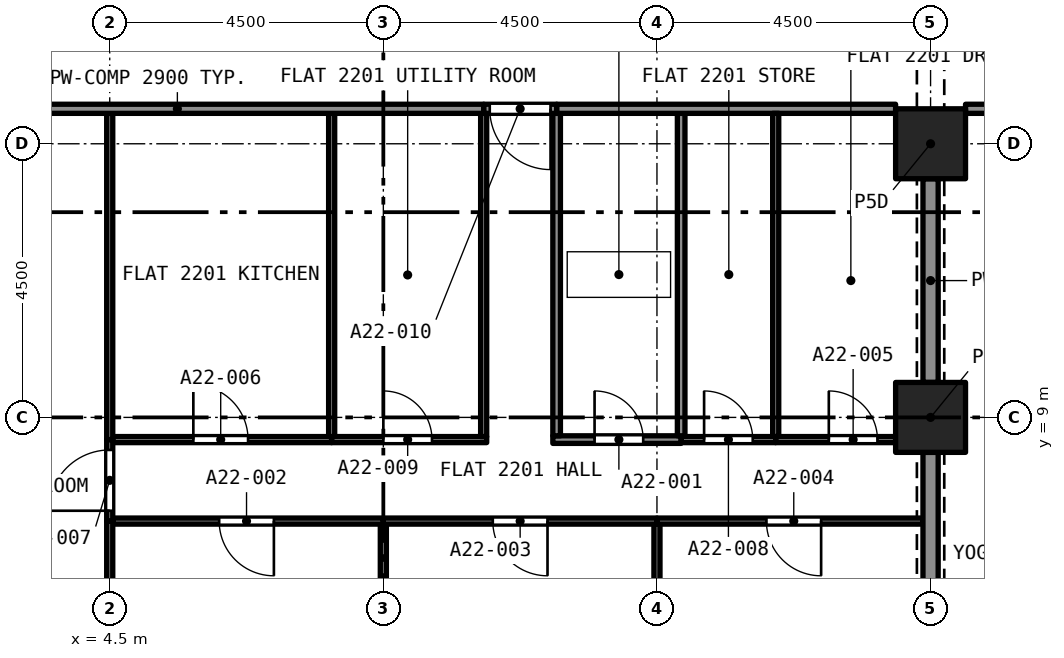
"""IFC4 building model, lengths in metres.
Left out: names, types, materials, properties, quantities, classifications, styles, units other than length and angle.
Written with IfcOpenShell. Run it as: python <this file> out.ifc"""

import sys

from ifc_helpers import new_model, si_unit, direction, frame, frame_2d, origin, origin_2d, place, context, subcontext, project, spatial, rectangle, extrude, element, fill, save


model = new_model("IFC4")
c1 = context("Model", 3, precision=1e-05, world=origin(), true_north=direction((0.0, 1.0)))
c2 = subcontext(c1, "Body", "Model", "MODEL_VIEW")
j1 = project(units=[si_unit("LENGTHUNIT", "METRE"), si_unit("PLANEANGLEUNIT", "RADIAN")], contexts=[c1])
p1 = place(None, origin())
s1 = spatial("IfcSite", under=j1, at=p1, CompositionType="ELEMENT")
p2 = place(p1, origin())
s2 = spatial("IfcBuilding", under=s1, at=p2, CompositionType="ELEMENT")
p3 = place(p2, frame((0.0, 0.0, 83.2)))
s3 = spatial("IfcBuildingStorey", under=s2, at=p3, CompositionType="ELEMENT", Elevation=83.2)
for number, where, z_axis, x_axis in (
    (1, (18.0, 9.0, 0.0), (0.0, 0.0, 1.0), (1.0, 0.0, 0.0)),
    (2, (18.0, 13.5, 0.0), (0.0, 0.0, 1.0), (1.0, 0.0, 0.0)),
):
    element("IfcColumn", number, at=place(p3, frame(where, z_axis=z_axis, x_axis=x_axis)), inside=s3, PredefinedType="COLUMN", context=c2, shape_type="SweptSolid", body=[
        extrude(rectangle(XDim=1.15, YDim=1.15, at=origin_2d()), origin(), (0.0, 0.0, 1.0), 3.2),
    ])
p4 = place(p3, frame((11.788, 8.635, 0.0), z_axis=(0.0, 0.0, 1.0), x_axis=(1.0, 0.0, 0.0)))
e3 = element("IfcWall", 3, at=p4, inside=s3, PredefinedType="PARTITIONING", context=c2, shape_type="SweptSolid", body=[
    extrude(rectangle(XDim=2.11, YDim=0.125, at=frame_2d((1.055, 0.0))), origin(), (0.0, 0.0, 1.0), 2.9),
])
p5 = place(p4, frame((0.686, 0.0, 0.0)))
e4 = element("IfcOpeningElement", 4, at=p5, cuts=e3, PredefinedType="OPENING", context=c2, shape_type="SweptSolid", body=[
    extrude(rectangle(XDim=0.8, YDim=2.1, at=frame_2d((0.4, 1.05))), frame((0.0, 0.073, 0.0), z_axis=(0.0, -1.0, 0.0), x_axis=(1.0, 0.0, 0.0)), (0.0, 0.0, 1.0), 0.145),
])
for number, where, z_axis, x_axis in (
    (5, (11.85, 8.698, 0.0), (0.0, 0.0, 1.0), (0.0, 1.0, 0.0)),
    (6, (13.898, 8.698, 0.0), (0.0, 0.0, 1.0), (0.0, 1.0, 0.0)),
):
    element("IfcWall", number, at=place(p3, frame(where, z_axis=z_axis, x_axis=x_axis)), inside=s3, PredefinedType="PARTITIONING", context=c2, shape_type="SweptSolid", body=[
        extrude(rectangle(XDim=5.302, YDim=0.125, at=frame_2d((2.651, 0.0))), origin(), (0.0, 0.0, 1.0), 2.9),
    ])
p6 = place(p3, frame((11.85, 14.075, 0.0), z_axis=(0.0, 0.0, 1.0), x_axis=(1.0, 0.0, 0.0)))
e7 = element("IfcWall", 7, at=p6, inside=s3, PredefinedType="PARTITIONING", context=c2, shape_type="SweptSolid", body=[
    extrude(rectangle(XDim=5.575, YDim=0.15, at=frame_2d((2.788, 0.0))), origin(), (0.0, 0.0, 1.0), 2.9),
])
p7 = place(p3, frame((9.0, 0.575, 0.0), z_axis=(0.0, 0.0, 1.0), x_axis=(0.0, 1.0, 0.0)))
e8 = element("IfcWall", 8, at=p7, inside=s3, PredefinedType="PARTITIONING", context=c2, shape_type="SweptSolid", body=[
    extrude(rectangle(XDim=6.67, YDim=0.1, at=frame_2d((3.335, 0.0))), origin(), (0.0, 0.0, 1.0), 2.9),
])
p8 = place(p3, frame((9.0, 7.295, 0.0), z_axis=(0.0, 0.0, 1.0), x_axis=(-1.0, 0.0, 0.0)))
e9 = element("IfcWall", 9, at=p8, inside=s3, PredefinedType="PARTITIONING", context=c2, shape_type="SweptSolid", body=[
    extrude(rectangle(XDim=4.45, YDim=0.1, at=frame_2d((2.225, 0.0))), origin(), (0.0, 0.0, 1.0), 2.9),
])
p9 = place(p8, frame((1.8, 0.0, 0.0)))
e10 = element("IfcOpeningElement", 10, at=p9, cuts=e9, PredefinedType="OPENING", context=c2, shape_type="SweptSolid", body=[
    extrude(rectangle(XDim=0.9, YDim=2.1, at=frame_2d((0.45, 1.05))), frame((0.0, 0.06, 0.0), z_axis=(0.0, -1.0, 0.0), x_axis=(1.0, 0.0, 0.0)), (0.0, 0.0, 1.0), 0.12),
])
p10 = place(p3, frame((4.5, 0.622, 0.0), z_axis=(0.0, 0.0, 1.0), x_axis=(0.0, 1.0, 0.0)))
e11 = element("IfcWall", 11, at=p10, inside=s3, PredefinedType="PARTITIONING", context=c2, shape_type="SweptSolid", body=[
    extrude(rectangle(XDim=6.673, YDim=0.1, at=frame_2d((3.336, 0.0))), origin(), (0.0, 0.0, 1.0), 2.9),
])
p11 = place(p3, frame((13.5, 0.575, 0.0), z_axis=(0.0, 0.0, 1.0), x_axis=(0.0, 1.0, 0.0)))
e12 = element("IfcWall", 12, at=p11, inside=s3, PredefinedType="PARTITIONING", context=c2, shape_type="SweptSolid", body=[
    extrude(rectangle(XDim=6.67, YDim=0.1, at=frame_2d((3.335, 0.0))), origin(), (0.0, 0.0, 1.0), 2.9),
])
p12 = place(p3, frame((13.5, 7.295, 0.0), z_axis=(0.0, 0.0, 1.0), x_axis=(-1.0, 0.0, 0.0)))
e13 = element("IfcWall", 13, at=p12, inside=s3, PredefinedType="PARTITIONING", context=c2, shape_type="SweptSolid", body=[
    extrude(rectangle(XDim=4.5, YDim=0.1, at=frame_2d((2.25, 0.0))), origin(), (0.0, 0.0, 1.0), 2.9),
])
p13 = place(p12, frame((1.8, 0.0, 0.0)))
e14 = element("IfcOpeningElement", 14, at=p13, cuts=e13, PredefinedType="OPENING", context=c2, shape_type="SweptSolid", body=[
    extrude(rectangle(XDim=0.9, YDim=2.1, at=frame_2d((0.45, 1.05))), frame((0.0, 0.06, 0.0), z_axis=(0.0, -1.0, 0.0), x_axis=(1.0, 0.0, 0.0)), (0.0, 0.0, 1.0), 0.12),
])
p14 = place(p3, frame((17.875, 7.295, 0.0), z_axis=(0.0, 0.0, 1.0), x_axis=(-1.0, 0.0, 0.0)))
e15 = element("IfcWall", 15, at=p14, inside=s3, PredefinedType="PARTITIONING", context=c2, shape_type="SweptSolid", body=[
    extrude(rectangle(XDim=4.375, YDim=0.1, at=frame_2d((2.188, 0.0))), origin(), (0.0, 0.0, 1.0), 2.9),
])
p15 = place(p14, frame((1.675, 0.0, 0.0)))
e16 = element("IfcOpeningElement", 16, at=p15, cuts=e15, PredefinedType="OPENING", context=c2, shape_type="SweptSolid", body=[
    extrude(rectangle(XDim=0.9, YDim=2.1, at=frame_2d((0.45, 1.05))), frame((0.0, 0.06, 0.0), z_axis=(0.0, -1.0, 0.0), x_axis=(1.0, 0.0, 0.0)), (0.0, 0.0, 1.0), 0.12),
])
p16 = place(p3, frame((18.0, 5.075, 0.0), z_axis=(0.0, 0.0, 1.0), x_axis=(0.0, 1.0, 0.0)))
e17 = element("IfcWall", 17, at=p16, inside=s3, PredefinedType="PARTITIONING", context=c2, shape_type="SweptSolid", body=[
    extrude(rectangle(XDim=3.35, YDim=0.25, at=frame_2d((1.675, 0.0))), origin(), (0.0, 0.0, 1.0), 2.38),
])
p17 = place(p3, frame((15.453, 8.635, 0.0), z_axis=(0.0, 0.0, 1.0), x_axis=(1.0, 0.0, 0.0)))
e18 = element("IfcWall", 18, at=p17, inside=s3, PredefinedType="PARTITIONING", context=c2, shape_type="SweptSolid", body=[
    extrude(rectangle(XDim=1.972, YDim=0.1, at=frame_2d((0.986, 0.0))), origin(), (0.0, 0.0, 1.0), 2.9),
])
p18 = place(p17, frame((0.874, 0.0, 0.0)))
e19 = element("IfcOpeningElement", 19, at=p18, cuts=e18, PredefinedType="OPENING", context=c2, shape_type="SweptSolid", body=[
    extrude(rectangle(XDim=0.8, YDim=2.1, at=frame_2d((0.4, 1.05))), frame((0.0, 0.06, 0.0), z_axis=(0.0, -1.0, 0.0), x_axis=(1.0, 0.0, 0.0)), (0.0, 0.0, 1.0), 0.12),
])
p19 = place(p3, frame((15.453, 8.685, 0.0), z_axis=(0.0, 0.0, 1.0), x_axis=(0.0, 1.0, 0.0)))
e20 = element("IfcWall", 20, at=p19, inside=s3, PredefinedType="PARTITIONING", context=c2, shape_type="SweptSolid", body=[
    extrude(rectangle(XDim=5.315, YDim=0.1, at=frame_2d((2.657, 0.0))), origin(), (0.0, 0.0, 1.0), 2.9),
])
p20 = place(p3, frame((18.0, 9.575, 0.0), z_axis=(0.0, 0.0, 1.0), x_axis=(0.0, 1.0, 0.0)))
e21 = element("IfcWall", 21, at=p20, inside=s3, PredefinedType="PARTITIONING", context=c2, shape_type="SweptSolid", body=[
    extrude(rectangle(XDim=3.35, YDim=0.25, at=frame_2d((1.675, 0.0))), origin(), (0.0, 0.0, 1.0), 2.38),
])
p21 = place(p3, frame((4.55, 8.635, 0.0), z_axis=(0.0, 0.0, 1.0), x_axis=(1.0, 0.0, 0.0)))
e22 = element("IfcWall", 22, at=p21, inside=s3, PredefinedType="PARTITIONING", context=c2, shape_type="SweptSolid", body=[
    extrude(rectangle(XDim=3.6, YDim=0.1, at=frame_2d((1.8, 0.0))), origin(), (0.0, 0.0, 1.0), 2.9),
])
p22 = place(p21, frame((1.325, 0.0, 0.0)))
e23 = element("IfcOpeningElement", 23, at=p22, cuts=e22, PredefinedType="OPENING", context=c2, shape_type="SweptSolid", body=[
    extrude(rectangle(XDim=0.9, YDim=2.1, at=frame_2d((0.45, 1.05))), frame((0.0, 0.06, 0.0), z_axis=(0.0, -1.0, 0.0), x_axis=(1.0, 0.0, 0.0)), (0.0, 0.0, 1.0), 0.12),
])
p23 = place(p3, frame((4.5, 7.295, 0.0), z_axis=(0.0, 0.0, 1.0), x_axis=(0.0, 1.0, 0.0)))
e24 = element("IfcWall", 24, at=p23, inside=s3, PredefinedType="PARTITIONING", context=c2, shape_type="SweptSolid", body=[
    extrude(rectangle(XDim=1.34, YDim=0.1, at=frame_2d((0.67, 0.0))), origin(), (0.0, 0.0, 1.0), 2.9),
])
p24 = place(p23, frame((0.17, 0.0, 0.0)))
e25 = element("IfcOpeningElement", 25, at=p24, cuts=e24, PredefinedType="OPENING", context=c2, shape_type="SweptSolid", body=[
    extrude(rectangle(XDim=1.0, YDim=2.1, at=frame_2d((0.5, 1.05))), frame((0.0, 0.06, 0.0), z_axis=(0.0, -1.0, 0.0), x_axis=(1.0, 0.0, 0.0)), (0.0, 0.0, 1.0), 0.12),
])
p25 = place(p3, frame((13.898, 8.635, 0.0), z_axis=(0.0, 0.0, 1.0), x_axis=(1.0, 0.0, 0.0)))
e26 = element("IfcWall", 26, at=p25, inside=s3, PredefinedType="PARTITIONING", context=c2, shape_type="SweptSolid", body=[
    extrude(rectangle(XDim=1.555, YDim=0.1, at=frame_2d((0.778, 0.0))), origin(), (0.0, 0.0, 1.0), 2.9),
])
p26 = place(p25, frame((0.378, 0.0, 0.0)))
e27 = element("IfcOpeningElement", 27, at=p26, cuts=e26, PredefinedType="OPENING", context=c2, shape_type="SweptSolid", body=[
    extrude(rectangle(XDim=0.8, YDim=2.1, at=frame_2d((0.4, 1.05))), frame((0.0, 0.06, 0.0), z_axis=(0.0, -1.0, 0.0), x_axis=(1.0, 0.0, 0.0)), (0.0, 0.0, 1.0), 0.12),
])
p27 = place(p3, frame((8.15, 8.635, 0.0), z_axis=(0.0, 0.0, 1.0), x_axis=(1.0, 0.0, 0.0)))
e28 = element("IfcWall", 28, at=p27, inside=s3, PredefinedType="PARTITIONING", context=c2, shape_type="SweptSolid", body=[
    extrude(rectangle(XDim=2.55, YDim=0.1, at=frame_2d((1.275, 0.0))), origin(), (0.0, 0.0, 1.0), 2.9),
])
p28 = place(p27, frame((0.85, 0.0, 0.0)))
e29 = element("IfcOpeningElement", 29, at=p28, cuts=e28, PredefinedType="OPENING", context=c2, shape_type="SweptSolid", body=[
    extrude(rectangle(XDim=0.8, YDim=2.1, at=frame_2d((0.4, 1.05))), frame((0.0, 0.06, 0.0), z_axis=(0.0, -1.0, 0.0), x_axis=(1.0, 0.0, 0.0)), (0.0, 0.0, 1.0), 0.12),
])
p29 = place(p3, frame((10.65, 8.685, 0.0), z_axis=(0.0, 0.0, 1.0), x_axis=(0.0, 1.0, 0.0)))
e30 = element("IfcWall", 30, at=p29, inside=s3, PredefinedType="PARTITIONING", context=c2, shape_type="SweptSolid", body=[
    extrude(rectangle(XDim=5.315, YDim=0.1, at=frame_2d((2.657, 0.0))), origin(), (0.0, 0.0, 1.0), 2.9),
])
p30 = place(p3, frame((11.85, 14.075, 0.0), z_axis=(0.0, 0.0, 1.0), x_axis=(-1.0, 0.0, 0.0)))
e31 = element("IfcWall", 31, at=p30, inside=s3, PredefinedType="PARTITIONING", context=c2, shape_type="SweptSolid", body=[
    extrude(rectangle(XDim=1.2, YDim=0.15, at=frame_2d((0.6, 0.0))), origin(), (0.0, 0.0, 1.0), 2.9),
])
p31 = place(p30, frame((0.1, 0.0, 0.0)))
e32 = element("IfcOpeningElement", 32, at=p31, cuts=e31, PredefinedType="OPENING", context=c2, shape_type="SweptSolid", body=[
    extrude(rectangle(XDim=1.0, YDim=2.1, at=frame_2d((0.5, 1.05))), frame((0.0, 0.085, 0.0), z_axis=(0.0, -1.0, 0.0), x_axis=(1.0, 0.0, 0.0)), (0.0, 0.0, 1.0), 0.17),
])
p32 = place(p3, frame((4.5, 8.635, 0.0), z_axis=(0.0, 0.0, 1.0), x_axis=(0.0, 1.0, 0.0)))
e33 = element("IfcWall", 33, at=p32, inside=s3, PredefinedType="PARTITIONING", context=c2, shape_type="SweptSolid", body=[
    extrude(rectangle(XDim=5.365, YDim=0.1, at=frame_2d((2.683, 0.0))), origin(), (0.0, 0.0, 1.0), 2.9),
])
p33 = place(p3, frame((8.15, 8.685, 0.0), z_axis=(0.0, 0.0, 1.0), x_axis=(0.0, 1.0, 0.0)))
e34 = element("IfcWall", 34, at=p33, inside=s3, PredefinedType="PARTITIONING", context=c2, shape_type="SweptSolid", body=[
    extrude(rectangle(XDim=5.315, YDim=0.1, at=frame_2d((2.657, 0.0))), origin(), (0.0, 0.0, 1.0), 2.9),
])
p34 = place(p3, frame((0.575, 14.075, 0.0), z_axis=(0.0, 0.0, 1.0), x_axis=(1.0, 0.0, 0.0)))
e35 = element("IfcWall", 35, at=p34, inside=s3, PredefinedType="PARTITIONING", context=c2, shape_type="SweptSolid", body=[
    extrude(rectangle(XDim=10.075, YDim=0.15, at=frame_2d((5.038, 0.0))), origin(), (0.0, 0.0, 1.0), 2.9),
])
p35 = place(p3, frame((22.5, 14.075, 0.0), z_axis=(0.0, 0.0, 1.0), x_axis=(-1.0, 0.0, 0.0)))
e36 = element("IfcWall", 36, at=p35, inside=s3, PredefinedType="PARTITIONING", context=c2, shape_type="SweptSolid", body=[
    extrude(rectangle(XDim=3.925, YDim=0.15, at=frame_2d((1.962, 0.0))), origin(), (0.0, 0.0, 1.0), 2.75),
])
p36 = place(p35, frame((1.75, 0.0, 0.0)))
e37 = element("IfcOpeningElement", 37, at=p36, cuts=e36, PredefinedType="OPENING", context=c2, shape_type="SweptSolid", body=[
    extrude(rectangle(XDim=1.0, YDim=2.1, at=frame_2d((0.5, 1.05))), frame((0.0, 0.085, 0.0), z_axis=(0.0, -1.0, 0.0), x_axis=(1.0, 0.0, 0.0)), (0.0, 0.0, 1.0), 0.17),
])
p37 = place(p5, origin())
e38 = element("IfcDoor", 38, at=p37, inside=s3, OperationType="SINGLE_SWING_RIGHT", PredefinedType="DOOR", context=c2, shape_type="SweptSolid", body=[
    extrude(rectangle(XDim=0.8, YDim=2.1, at=frame_2d((0.4, 1.05))), frame((0.0, 0.025, 0.0), z_axis=(0.0, -1.0, 0.0), x_axis=(1.0, 0.0, 0.0)), (0.0, 0.0, 1.0), 0.05),
])
fill(e4, e38)
p38 = place(p9, origin())
e39 = element("IfcDoor", 39, at=p38, inside=s3, OperationType="SINGLE_SWING_RIGHT", PredefinedType="DOOR", context=c2, shape_type="SweptSolid", body=[
    extrude(rectangle(XDim=0.9, YDim=2.1, at=frame_2d((0.45, 1.05))), frame((0.0, 0.025, 0.0), z_axis=(0.0, -1.0, 0.0), x_axis=(1.0, 0.0, 0.0)), (0.0, 0.0, 1.0), 0.05),
])
fill(e10, e39)
p39 = place(p13, origin())
e40 = element("IfcDoor", 40, at=p39, inside=s3, OperationType="SINGLE_SWING_LEFT", PredefinedType="DOOR", context=c2, shape_type="SweptSolid", body=[
    extrude(rectangle(XDim=0.9, YDim=2.1, at=frame_2d((0.45, 1.05))), frame((0.0, 0.025, 0.0), z_axis=(0.0, -1.0, 0.0), x_axis=(1.0, 0.0, 0.0)), (0.0, 0.0, 1.0), 0.05),
])
fill(e14, e40)
p40 = place(p15, origin())
e41 = element("IfcDoor", 41, at=p40, inside=s3, OperationType="SINGLE_SWING_LEFT", PredefinedType="DOOR", context=c2, shape_type="SweptSolid", body=[
    extrude(rectangle(XDim=0.9, YDim=2.1, at=frame_2d((0.45, 1.05))), frame((0.0, 0.025, 0.0), z_axis=(0.0, -1.0, 0.0), x_axis=(1.0, 0.0, 0.0)), (0.0, 0.0, 1.0), 0.05),
])
fill(e16, e41)
p41 = place(p18, origin())
e42 = element("IfcDoor", 42, at=p41, inside=s3, OperationType="SINGLE_SWING_RIGHT", PredefinedType="DOOR", context=c2, shape_type="SweptSolid", body=[
    extrude(rectangle(XDim=0.8, YDim=2.1, at=frame_2d((0.4, 1.05))), frame((0.0, 0.025, 0.0), z_axis=(0.0, -1.0, 0.0), x_axis=(1.0, 0.0, 0.0)), (0.0, 0.0, 1.0), 0.05),
])
fill(e19, e42)
p42 = place(p22, origin())
e43 = element("IfcDoor", 43, at=p42, inside=s3, OperationType="SINGLE_SWING_LEFT", PredefinedType="DOOR", context=c2, shape_type="SweptSolid", body=[
    extrude(rectangle(XDim=0.9, YDim=2.1, at=frame_2d((0.45, 1.05))), frame((0.0, 0.025, 0.0), z_axis=(0.0, -1.0, 0.0), x_axis=(1.0, 0.0, 0.0)), (0.0, 0.0, 1.0), 0.05),
])
fill(e23, e43)
p43 = place(p24, origin())
e44 = element("IfcDoor", 44, at=p43, inside=s3, OperationType="SINGLE_SWING_RIGHT", PredefinedType="DOOR", context=c2, shape_type="SweptSolid", body=[
    extrude(rectangle(XDim=1.0, YDim=2.1, at=frame_2d((0.5, 1.05))), frame((0.0, 0.025, 0.0), z_axis=(0.0, -1.0, 0.0), x_axis=(1.0, 0.0, 0.0)), (0.0, 0.0, 1.0), 0.05),
])
fill(e25, e44)
p44 = place(p26, origin())
e45 = element("IfcDoor", 45, at=p44, inside=s3, OperationType="SINGLE_SWING_RIGHT", PredefinedType="DOOR", context=c2, shape_type="SweptSolid", body=[
    extrude(rectangle(XDim=0.8, YDim=2.1, at=frame_2d((0.4, 1.05))), frame((0.0, 0.025, 0.0), z_axis=(0.0, -1.0, 0.0), x_axis=(1.0, 0.0, 0.0)), (0.0, 0.0, 1.0), 0.05),
])
fill(e27, e45)
p45 = place(p28, origin())
e46 = element("IfcDoor", 46, at=p45, inside=s3, OperationType="SINGLE_SWING_LEFT", PredefinedType="DOOR", context=c2, shape_type="SweptSolid", body=[
    extrude(rectangle(XDim=0.8, YDim=2.1, at=frame_2d((0.4, 1.05))), frame((0.0, 0.025, 0.0), z_axis=(0.0, -1.0, 0.0), x_axis=(1.0, 0.0, 0.0)), (0.0, 0.0, 1.0), 0.05),
])
fill(e29, e46)
p46 = place(p31, origin())
e47 = element("IfcDoor", 47, at=p46, inside=s3, OperationType="SINGLE_SWING_RIGHT", PredefinedType="DOOR", context=c2, shape_type="SweptSolid", body=[
    extrude(rectangle(XDim=1.0, YDim=2.1, at=frame_2d((0.5, 1.05))), frame((0.0, 0.025, 0.0), z_axis=(0.0, -1.0, 0.0), x_axis=(1.0, 0.0, 0.0)), (0.0, 0.0, 1.0), 0.05),
])
fill(e32, e47)
save(model, sys.argv[1])
